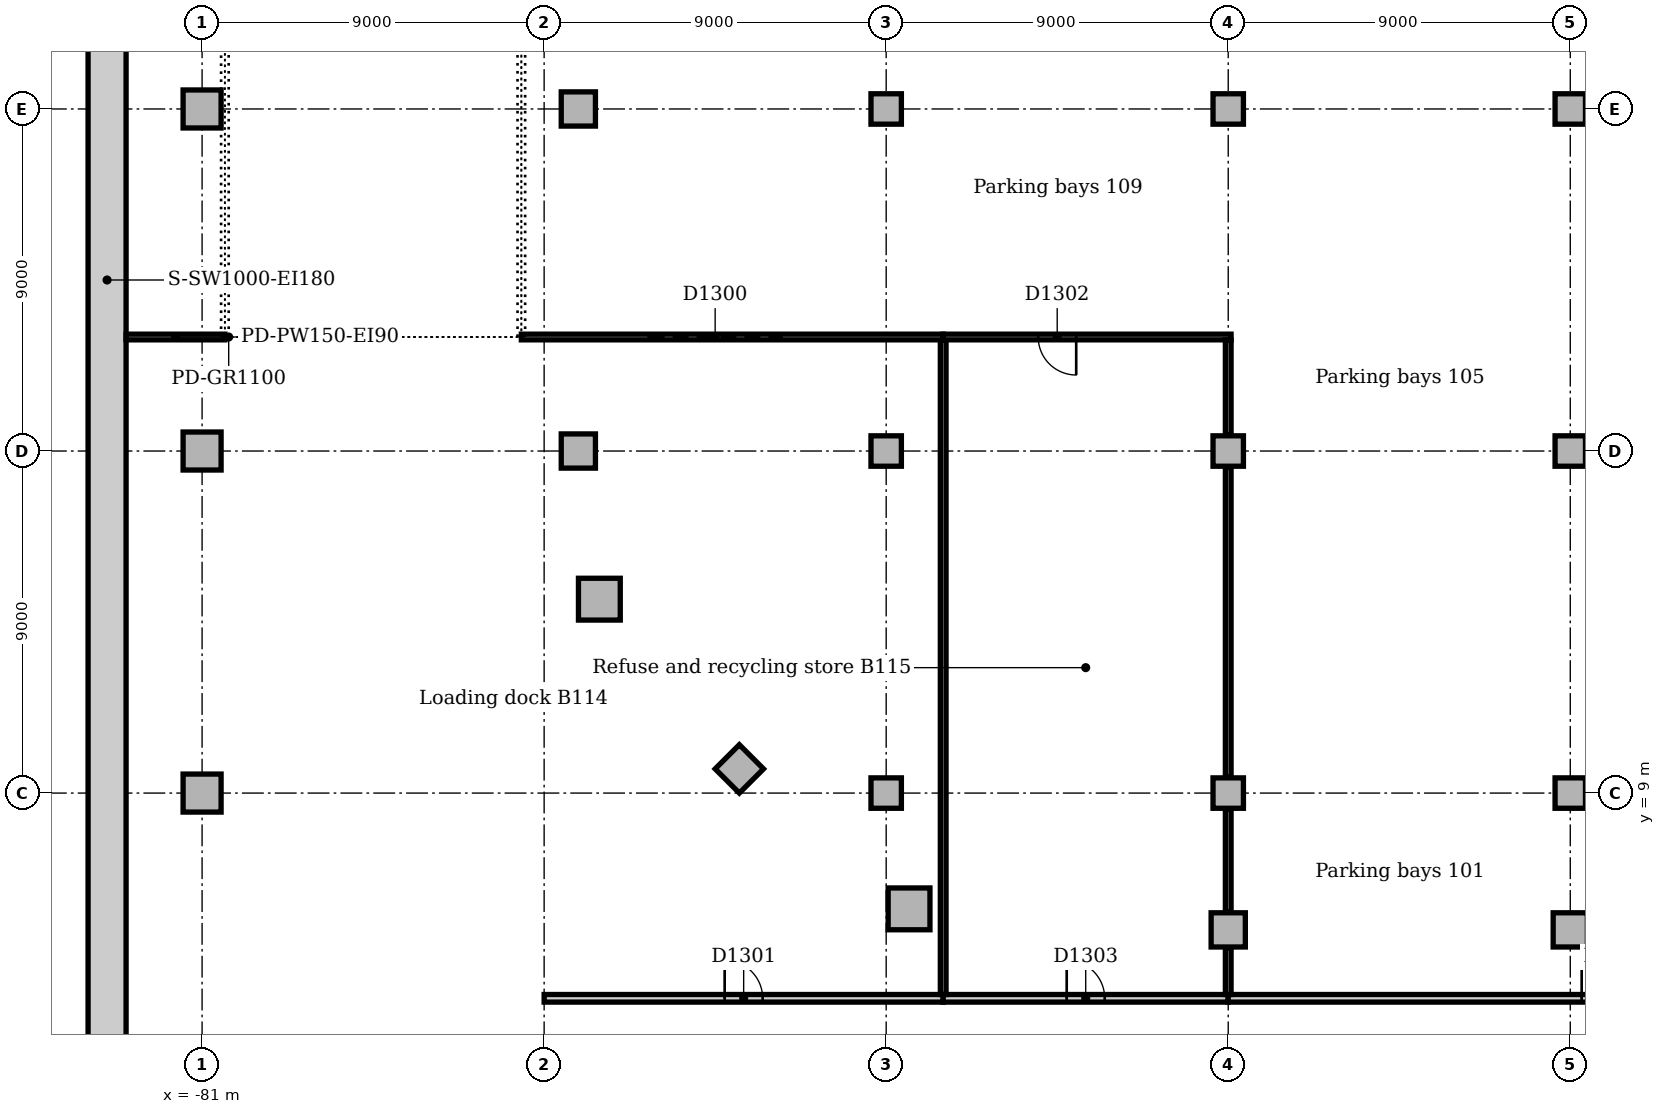
"""IFC4 building model, lengths in metres.
Left out: names, types, materials, properties, quantities, classifications, styles, units other than length and angle.
Written with IfcOpenShell. Run it as: python <this file> out.ifc"""

import sys

from ifc_helpers import new_model, si_unit, direction, frame, frame_2d, origin, origin_2d, place, context, subcontext, project, spatial, rectangle, extrude, element, fill, save


model = new_model("IFC4")
c1 = context("Model", 3, precision=1e-05, world=origin(), true_north=direction((0.0, 1.0)))
c2 = subcontext(c1, "Body", "Model", "MODEL_VIEW")
j1 = project(units=[si_unit("LENGTHUNIT", "METRE"), si_unit("PLANEANGLEUNIT", "RADIAN")], contexts=[c1])
p1 = place(None, origin())
s1 = spatial("IfcSite", under=j1, at=p1, CompositionType="ELEMENT")
p2 = place(p1, origin())
s2 = spatial("IfcBuilding", under=s1, at=p2, CompositionType="ELEMENT")
p3 = place(p2, frame((0.0, 0.0, -5.0)))
s3 = spatial("IfcBuildingStorey", under=s2, at=p3, CompositionType="ELEMENT", Elevation=-5.0)
for number, where, z_axis, x_axis in (
    (1, (-62.398, 5.953, 0.0), (0.0, 0.0, 1.0), (1.0, 0.0, 0.0)),
    (2, (-70.547, 14.102, 0.0), (0.0, 0.0, 1.0), (1.0, 0.0, 0.0)),
):
    element("IfcColumn", number, at=place(p3, frame(where, z_axis=z_axis, x_axis=x_axis)), inside=s3, PredefinedType="COLUMN", context=c2, shape_type="SweptSolid", body=[
        extrude(rectangle(XDim=1.1, YDim=1.1, at=origin_2d()), origin(), (0.0, 0.0, 1.0), 4.7),
    ])
for number, where, z_axis, x_axis in (
    (3, (-54.0, 5.4, 0.0), (0.0, 0.0, 1.0), (1.0, 0.0, 0.0)),
    (4, (-45.0, 5.4, 0.0), (0.0, 0.0, 1.0), (1.0, 0.0, 0.0)),
    (5, (-71.1, 18.0, 0.0), (0.0, 0.0, 1.0), (1.0, 0.0, 0.0)),
    (6, (-71.1, 27.0, 0.0), (0.0, 0.0, 1.0), (1.0, 0.0, 0.0)),
    (7, (-66.864, 9.636, 0.0), (0.0, 0.0, 1.0), (0.707, 0.707, 0.0)),
):
    element("IfcColumn", number, at=place(p3, frame(where, z_axis=z_axis, x_axis=x_axis)), inside=s3, PredefinedType="COLUMN", context=c2, shape_type="SweptSolid", body=[
        extrude(rectangle(XDim=0.9, YDim=0.9, at=origin_2d()), origin(), (0.0, 0.0, 1.0), 4.7),
    ])
for number, where, z_axis, x_axis in (
    (8, (-63.0, 9.0, 0.0), (0.0, 0.0, 1.0), (1.0, 0.0, 0.0)),
    (9, (-63.0, 18.0, 0.0), (0.0, 0.0, 1.0), (1.0, 0.0, 0.0)),
    (10, (-63.0, 27.0, 0.0), (0.0, 0.0, 1.0), (1.0, 0.0, 0.0)),
    (11, (-54.0, 9.0, 0.0), (0.0, 0.0, 1.0), (1.0, 0.0, 0.0)),
    (12, (-54.0, 18.0, 0.0), (0.0, 0.0, 1.0), (1.0, 0.0, 0.0)),
    (13, (-54.0, 27.0, 0.0), (0.0, 0.0, 1.0), (1.0, 0.0, 0.0)),
    (14, (-45.0, 9.0, 0.0), (0.0, 0.0, 1.0), (1.0, 0.0, 0.0)),
    (15, (-45.0, 18.0, 0.0), (0.0, 0.0, 1.0), (1.0, 0.0, 0.0)),
    (16, (-45.0, 27.0, 0.0), (0.0, 0.0, 1.0), (1.0, 0.0, 0.0)),
):
    element("IfcColumn", number, at=place(p3, frame(where, z_axis=z_axis, x_axis=x_axis)), inside=s3, PredefinedType="COLUMN", context=c2, shape_type="SweptSolid", body=[
        extrude(rectangle(XDim=0.8, YDim=0.8, at=origin_2d()), origin(), (0.0, 0.0, 1.0), 4.7),
    ])
p4 = place(p3, frame((-83.5, -8.641, 0.0), z_axis=(0.0, 0.0, 1.0), x_axis=(0.0, 1.0, 0.0)))
e17 = element("IfcWall", 17, at=p4, inside=s3, PredefinedType="SOLIDWALL", context=c2, shape_type="SweptSolid", body=[
    extrude(rectangle(XDim=62.282, YDim=1.0, at=frame_2d((31.141, 0.0))), origin(), (0.0, 0.0, 1.0), 4.7),
])
for number, where, z_axis, x_axis in (
    (18, (-81.0, 9.0, 0.0), (0.0, 0.0, 1.0), (1.0, 0.0, 0.0)),
    (19, (-81.0, 18.0, 0.0), (0.0, 0.0, 1.0), (1.0, 0.0, 0.0)),
    (20, (-81.0, 27.0, 0.0), (0.0, 0.0, 1.0), (1.0, 0.0, 0.0)),
):
    element("IfcColumn", number, at=place(p3, frame(where, z_axis=z_axis, x_axis=x_axis)), inside=s3, PredefinedType="COLUMN", context=c2, shape_type="SweptSolid", body=[
        extrude(rectangle(XDim=1.0, YDim=1.0, at=origin_2d()), origin(), (0.0, 0.0, 1.0), 4.7),
    ])
p5 = place(p3, frame((-72.0, 3.6, 0.0), z_axis=(0.0, 0.0, 1.0), x_axis=(1.0, 0.0, 0.0)))
e21 = element("IfcWall", 21, at=p5, inside=s3, PredefinedType="PARTITIONING", context=c2, shape_type="SweptSolid", body=[
    extrude(rectangle(XDim=10.5, YDim=0.2, at=frame_2d((5.25, 0.0))), origin(), (0.0, 0.0, 1.0), 4.7),
])
p6 = place(p5, frame((4.75, 0.0, 0.0)))
e22 = element("IfcOpeningElement", 22, at=p6, cuts=e21, PredefinedType="OPENING", context=c2, shape_type="SweptSolid", body=[
    extrude(rectangle(XDim=1.0, YDim=2.1, at=frame_2d((0.5, 1.05))), frame((0.0, 0.11, 0.0), z_axis=(0.0, -1.0, 0.0), x_axis=(1.0, 0.0, 0.0)), (0.0, 0.0, 1.0), 0.22),
])
p7 = place(p3, frame((-61.5, 3.6, 0.0), z_axis=(0.0, 0.0, 1.0), x_axis=(1.0, 0.0, 0.0)))
e23 = element("IfcWall", 23, at=p7, inside=s3, PredefinedType="PARTITIONING", context=c2, shape_type="SweptSolid", body=[
    extrude(rectangle(XDim=7.5, YDim=0.2, at=frame_2d((3.75, 0.0))), origin(), (0.0, 0.0, 1.0), 4.7),
])
p8 = place(p7, frame((3.25, 0.0, 0.0)))
e24 = element("IfcOpeningElement", 24, at=p8, cuts=e23, PredefinedType="OPENING", context=c2, shape_type="SweptSolid", body=[
    extrude(rectangle(XDim=1.0, YDim=2.1, at=frame_2d((0.5, 1.05))), frame((0.0, 0.11, 0.0), z_axis=(0.0, -1.0, 0.0), x_axis=(1.0, 0.0, 0.0)), (0.0, 0.0, 1.0), 0.22),
])
p9 = place(p3, frame((-54.0, 3.6, 0.0), z_axis=(0.0, 0.0, 1.0), x_axis=(1.0, 0.0, 0.0)))
e25 = element("IfcWall", 25, at=p9, inside=s3, PredefinedType="PARTITIONING", context=c2, shape_type="SweptSolid", body=[
    extrude(rectangle(XDim=27.1, YDim=0.2, at=frame_2d((13.55, 0.0))), origin(), (0.0, 0.0, 1.0), 4.7),
])
p10 = place(p9, frame((9.3, 0.0, 0.0)))
e26 = element("IfcOpeningElement", 26, at=p10, cuts=e25, PredefinedType="OPENING", context=c2, shape_type="SweptSolid", body=[
    extrude(rectangle(XDim=1.8, YDim=2.1, at=frame_2d((0.9, 1.05))), frame((0.0, 0.11, 0.0), z_axis=(0.0, -1.0, 0.0), x_axis=(1.0, 0.0, 0.0)), (0.0, 0.0, 1.0), 0.22),
])
p11 = place(p9, frame((19.5, 0.0, 0.0)))
e27 = element("IfcOpeningElement", 27, at=p11, cuts=e25, PredefinedType="OPENING", context=c2, shape_type="SweptSolid", body=[
    extrude(rectangle(XDim=1.8, YDim=2.1, at=frame_2d((0.9, 1.05))), frame((0.0, 0.11, 0.0), z_axis=(0.0, -1.0, 0.0), x_axis=(1.0, 0.0, 0.0)), (0.0, 0.0, 1.0), 0.22),
])
p12 = place(p3, frame((-61.5, 3.7, 0.0), z_axis=(0.0, 0.0, 1.0), x_axis=(0.0, 1.0, 0.0)))
e28 = element("IfcWall", 28, at=p12, inside=s3, PredefinedType="PARTITIONING", context=c2, shape_type="SweptSolid", body=[
    extrude(rectangle(XDim=17.225, YDim=0.15, at=frame_2d((8.613, 0.0))), origin(), (0.0, 0.0, 1.0), 4.7),
])
p13 = place(p3, frame((-83.0, 21.0, 0.0), z_axis=(0.0, 0.0, 1.0), x_axis=(1.0, 0.0, 0.0)))
e29 = element("IfcWall", 29, at=p13, inside=s3, PredefinedType="PARTITIONING", context=c2, shape_type="SweptSolid", body=[
    extrude(rectangle(XDim=2.6, YDim=0.15, at=frame_2d((1.3, 0.0))), origin(), (0.0, 0.0, 1.0), 4.7),
])
p14 = place(p3, frame((-72.6, 21.0, 0.0), z_axis=(0.0, 0.0, 1.0), x_axis=(1.0, 0.0, 0.0)))
e30 = element("IfcWall", 30, at=p14, inside=s3, PredefinedType="PARTITIONING", context=c2, shape_type="SweptSolid", body=[
    extrude(rectangle(XDim=11.1, YDim=0.15, at=frame_2d((5.55, 0.0))), origin(), (0.0, 0.0, 1.0), 4.7),
])
p15 = place(p14, frame((3.35, 0.0, 0.0)))
e31 = element("IfcOpeningElement", 31, at=p15, cuts=e30, PredefinedType="OPENING", context=c2, shape_type="SweptSolid", body=[
    extrude(rectangle(XDim=3.5, YDim=4.0, at=frame_2d((1.75, 2.0))), frame((0.0, 0.085, 0.0), z_axis=(0.0, -1.0, 0.0), x_axis=(1.0, 0.0, 0.0)), (0.0, 0.0, 1.0), 0.17),
])
p16 = place(p3, frame((-61.5, 21.0, 0.0), z_axis=(0.0, 0.0, 1.0), x_axis=(1.0, 0.0, 0.0)))
e32 = element("IfcWall", 32, at=p16, inside=s3, PredefinedType="PARTITIONING", context=c2, shape_type="SweptSolid", body=[
    extrude(rectangle(XDim=7.575, YDim=0.15, at=frame_2d((3.788, 0.0))), origin(), (0.0, 0.0, 1.0), 4.7),
])
p17 = place(p16, frame((2.5, 0.0, 0.0)))
e33 = element("IfcOpeningElement", 33, at=p17, cuts=e32, PredefinedType="OPENING", context=c2, shape_type="SweptSolid", body=[
    extrude(rectangle(XDim=1.0, YDim=2.1, at=frame_2d((0.5, 1.05))), frame((0.0, 0.085, 0.0), z_axis=(0.0, -1.0, 0.0), x_axis=(1.0, 0.0, 0.0)), (0.0, 0.0, 1.0), 0.17),
])
p18 = place(p3, frame((-54.0, 3.7, 0.0), z_axis=(0.0, 0.0, 1.0), x_axis=(0.0, 1.0, 0.0)))
e34 = element("IfcWall", 34, at=p18, inside=s3, PredefinedType="PARTITIONING", context=c2, shape_type="SweptSolid", body=[
    extrude(rectangle(XDim=1.23, YDim=0.15, at=frame_2d((0.615, 0.0))), origin(), (0.0, 0.0, 1.0), 4.7),
])
p19 = place(p3, frame((-54.0, 5.87, 0.0), z_axis=(0.0, 0.0, 1.0), x_axis=(0.0, 1.0, 0.0)))
e35 = element("IfcWall", 35, at=p19, inside=s3, PredefinedType="PARTITIONING", context=c2, shape_type="SweptSolid", body=[
    extrude(rectangle(XDim=2.71, YDim=0.15, at=frame_2d((1.355, 0.0))), origin(), (0.0, 0.0, 1.0), 4.7),
])
p20 = place(p3, frame((-54.0, 9.42, 0.0), z_axis=(0.0, 0.0, 1.0), x_axis=(0.0, 1.0, 0.0)))
e36 = element("IfcWall", 36, at=p20, inside=s3, PredefinedType="PARTITIONING", context=c2, shape_type="SweptSolid", body=[
    extrude(rectangle(XDim=8.16, YDim=0.15, at=frame_2d((4.08, 0.0))), origin(), (0.0, 0.0, 1.0), 4.7),
])
p21 = place(p3, frame((-54.0, 18.42, 0.0), z_axis=(0.0, 0.0, 1.0), x_axis=(0.0, 1.0, 0.0)))
e37 = element("IfcWall", 37, at=p21, inside=s3, PredefinedType="PARTITIONING", context=c2, shape_type="SweptSolid", body=[
    extrude(rectangle(XDim=2.505, YDim=0.15, at=frame_2d((1.252, 0.0))), origin(), (0.0, 0.0, 1.0), 4.7),
])
p22 = place(p10, origin())
e38 = element("IfcDoor", 38, at=p22, inside=s3, OperationType="DOUBLE_DOOR_SINGLE_SWING", PredefinedType="DOOR", context=c2, shape_type="SweptSolid", body=[
    extrude(rectangle(XDim=1.8, YDim=2.1, at=frame_2d((0.9, 1.05))), frame((0.0, 0.025, 0.0), z_axis=(0.0, -1.0, 0.0), x_axis=(1.0, 0.0, 0.0)), (0.0, 0.0, 1.0), 0.05),
])
fill(e26, e38)
p23 = place(p15, origin())
e39 = element("IfcDoor", 39, at=p23, inside=s3, OperationType="ROLLINGUP", PredefinedType="GATE", context=c2, shape_type="SweptSolid", body=[
    extrude(rectangle(XDim=3.5, YDim=4.0, at=frame_2d((1.75, 2.0))), frame((0.0, 0.025, 0.0), z_axis=(0.0, -1.0, 0.0), x_axis=(1.0, 0.0, 0.0)), (0.0, 0.0, 1.0), 0.05),
])
fill(e31, e39)
p24 = place(p6, origin())
e40 = element("IfcDoor", 40, at=p24, inside=s3, OperationType="SINGLE_SWING_LEFT", PredefinedType="DOOR", context=c2, shape_type="SweptSolid", body=[
    extrude(rectangle(XDim=1.0, YDim=2.1, at=frame_2d((0.5, 1.05))), frame((0.0, 0.025, 0.0), z_axis=(0.0, -1.0, 0.0), x_axis=(1.0, 0.0, 0.0)), (0.0, 0.0, 1.0), 0.05),
])
fill(e22, e40)
p25 = place(p17, frame((1.0, 0.0, 0.0), z_axis=(0.0, 0.0, 1.0), x_axis=(-1.0, 0.0, 0.0)))
e41 = element("IfcDoor", 41, at=p25, inside=s3, OperationType="SINGLE_SWING_LEFT", PredefinedType="DOOR", context=c2, shape_type="SweptSolid", body=[
    extrude(rectangle(XDim=1.0, YDim=2.1, at=frame_2d((0.5, 1.05))), frame((0.0, 0.025, 0.0), z_axis=(0.0, -1.0, 0.0), x_axis=(1.0, 0.0, 0.0)), (0.0, 0.0, 1.0), 0.05),
])
fill(e33, e41)
p26 = place(p8, origin())
e42 = element("IfcDoor", 42, at=p26, inside=s3, OperationType="SINGLE_SWING_LEFT", PredefinedType="DOOR", context=c2, shape_type="SweptSolid", body=[
    extrude(rectangle(XDim=1.0, YDim=2.1, at=frame_2d((0.5, 1.05))), frame((0.0, 0.025, 0.0), z_axis=(0.0, -1.0, 0.0), x_axis=(1.0, 0.0, 0.0)), (0.0, 0.0, 1.0), 0.05),
])
fill(e24, e42)
save(model, sys.argv[1])
